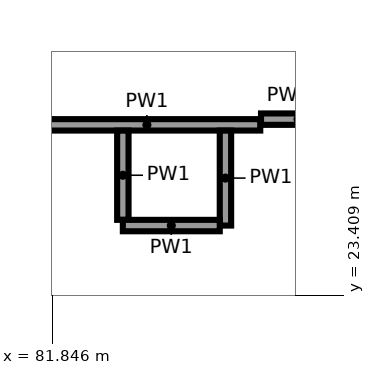
"""IFC4 building model, lengths in metres.
Left out: names, types, materials, properties, quantities, classifications, styles, units other than length and angle.
Written with IfcOpenShell. Run it as: python <this file> out.ifc"""

import sys

from ifc_helpers import new_model, si_unit, direction, frame, frame_2d, origin, place, context, subcontext, project, spatial, rectangle, extrude, element, save


model = new_model("IFC4")
c1 = context("Model", 3, precision=1e-05, world=origin(), true_north=direction((0.0, 1.0)))
c2 = subcontext(c1, "Body", "Model", "MODEL_VIEW")
j1 = project(units=[si_unit("LENGTHUNIT", "METRE"), si_unit("PLANEANGLEUNIT", "RADIAN")], contexts=[c1])
p1 = place(None, origin())
s1 = spatial("IfcSite", under=j1, at=p1, CompositionType="ELEMENT")
p2 = place(p1, origin())
s2 = spatial("IfcBuilding", under=s1, at=p2, CompositionType="ELEMENT")
p3 = place(p2, frame((0.0, 0.0, 18.0)))
s3 = spatial("IfcBuildingStorey", under=s2, at=p3, CompositionType="ELEMENT", Elevation=18.0)
p4 = place(p3, frame((84.583, 25.65, 0.0), z_axis=(0.0, 0.0, 1.0), x_axis=(-1.0, 0.0, 0.0)))
e1 = element("IfcWall", 1, at=p4, inside=s3, PredefinedType="PARTITIONING", context=c2, shape_type="SweptSolid", body=[
    extrude(rectangle(XDim=2.983, YDim=0.15, at=frame_2d((1.491, 0.0))), origin(), (0.0, 0.0, 1.0), 5.6),
])
p5 = place(p3, frame((84.125, 24.325, 0.0), z_axis=(0.0, 0.0, 1.0), x_axis=(0.0, 1.0, 0.0)))
e2 = element("IfcWall", 2, at=p5, inside=s3, PredefinedType="PARTITIONING", context=c2, shape_type="SweptSolid", body=[
    extrude(rectangle(XDim=1.249, YDim=0.15, at=frame_2d((0.625, 0.0))), origin(), (0.0, 0.0, 1.0), 5.6),
])
p6 = place(p3, frame((82.775, 25.574, 0.0), z_axis=(0.0, 0.0, 1.0), x_axis=(0.0, -1.0, 0.0)))
e3 = element("IfcWall", 3, at=p6, inside=s3, PredefinedType="PARTITIONING", context=c2, shape_type="SweptSolid", body=[
    extrude(rectangle(XDim=1.174, YDim=0.15, at=frame_2d((0.587, 0.0))), origin(), (0.0, 0.0, 1.0), 5.6),
])
p7 = place(p3, frame((82.775, 24.325, 0.0), z_axis=(0.0, 0.0, 1.0), x_axis=(1.0, 0.0, 0.0)))
e4 = element("IfcWall", 4, at=p7, inside=s3, PredefinedType="PARTITIONING", context=c2, shape_type="SweptSolid", body=[
    extrude(rectangle(XDim=1.275, YDim=0.15, at=frame_2d((0.638, 0.0))), origin(), (0.0, 0.0, 1.0), 5.6),
])
p8 = place(p3, frame((85.567, 25.725, 0.0), z_axis=(0.0, 0.0, 1.0), x_axis=(-1.0, 0.0, 0.0)))
e5 = element("IfcWall", 5, at=p8, inside=s3, PredefinedType="PARTITIONING", context=c2, shape_type="SweptSolid", body=[
    extrude(rectangle(XDim=0.974, YDim=0.15, at=frame_2d((0.487, 0.0))), origin(), (0.0, 0.0, 1.0), 4.5),
])
save(model, sys.argv[1])
